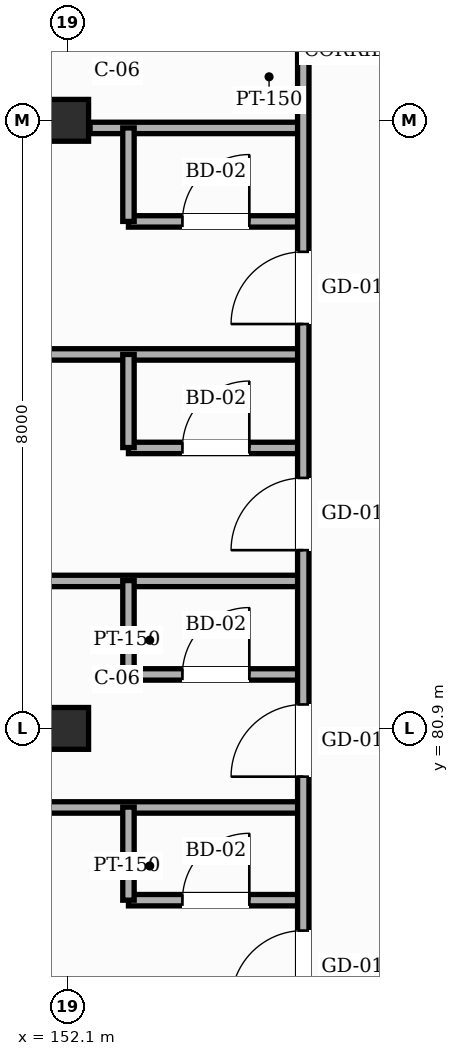
"""IFC4 building model, lengths in metres.
Left out: names, types, materials, properties, quantities, classifications, styles, units other than length and angle.
Written with IfcOpenShell. Run it as: python <this file> out.ifc"""

import sys

from ifc_helpers import new_model, si_unit, direction, frame, frame_2d, origin, origin_2d, place, context, subcontext, project, spatial, rectangle, hollow_rectangle, extrude, element, fill, save


model = new_model("IFC4")
c1 = context("Model", 3, precision=1e-05, world=origin(), true_north=direction((0.0, 1.0)))
c2 = subcontext(c1, "Body", "Model", "MODEL_VIEW")
j1 = project(units=[si_unit("LENGTHUNIT", "METRE"), si_unit("PLANEANGLEUNIT", "RADIAN")], contexts=[c1])
p1 = place(None, origin())
s1 = spatial("IfcSite", under=j1, at=p1, CompositionType="ELEMENT")
p2 = place(p1, origin())
s2 = spatial("IfcBuilding", under=s1, at=p2, CompositionType="ELEMENT")
p3 = place(p2, frame((0.0, 0.0, 31.8)))
s3 = spatial("IfcBuildingStorey", under=s2, at=p3, CompositionType="ELEMENT", Elevation=31.8)
for number, where, z_axis, x_axis in (
    (1, (152.1, 80.9, 0.0), (0.0, 0.0, 1.0), (1.0, 0.0, 0.0)),
    (2, (152.1, 88.9, 0.0), (0.0, 0.0, 1.0), (1.0, 0.0, 0.0)),
):
    element("IfcColumn", number, at=place(p3, frame(where, z_axis=z_axis, x_axis=x_axis)), inside=s3, PredefinedType="COLUMN", context=c2, shape_type="SweptSolid", body=[
        extrude(hollow_rectangle(XDim=0.55, YDim=0.55, WallThickness=0.022, InnerFilletRadius=0.022, OuterFilletRadius=0.044, at=origin_2d()), origin(), (0.0, 0.0, 1.0), 3.6),
    ])
p4 = place(p3, frame((152.9, 78.64, 0.0), z_axis=(0.0, 0.0, 1.0), x_axis=(1.0, 0.0, 0.0)))
e3 = element("IfcWall", 3, at=p4, inside=s3, PredefinedType="PARTITIONING", context=c2, shape_type="SweptSolid", body=[
    extrude(rectangle(XDim=2.3, YDim=0.15, at=frame_2d((1.15, 0.0))), origin(), (0.0, 0.0, 1.0), 3.365),
])
p5 = place(p4, frame((0.71, 0.0, 0.0)))
e4 = element("IfcOpeningElement", 4, at=p5, cuts=e3, PredefinedType="OPENING", context=c2, shape_type="SweptSolid", body=[
    extrude(rectangle(XDim=0.88, YDim=2.12, at=frame_2d((0.44, 1.06))), frame((0.0, 0.085, 0.0), z_axis=(0.0, -1.0, 0.0), x_axis=(1.0, 0.0, 0.0)), (0.0, 0.0, 1.0), 0.17),
])
p6 = place(p3, frame((144.2, 79.86, 0.0), z_axis=(0.0, 0.0, 1.0), x_axis=(1.0, 0.0, 0.0)))
e5 = element("IfcWall", 5, at=p6, inside=s3, PredefinedType="PARTITIONING", context=c2, shape_type="SweptSolid", body=[
    extrude(rectangle(XDim=11.0, YDim=0.15, at=frame_2d((5.5, 0.0))), origin(), (0.0, 0.0, 1.0), 3.365),
])
p7 = place(p3, frame((152.9, 81.61, 0.0), z_axis=(0.0, 0.0, 1.0), x_axis=(1.0, 0.0, 0.0)))
e6 = element("IfcWall", 6, at=p7, inside=s3, PredefinedType="PARTITIONING", context=c2, shape_type="SweptSolid", body=[
    extrude(rectangle(XDim=2.3, YDim=0.15, at=frame_2d((1.15, 0.0))), origin(), (0.0, 0.0, 1.0), 3.365),
])
p8 = place(p7, frame((0.71, 0.0, 0.0)))
e7 = element("IfcOpeningElement", 7, at=p8, cuts=e6, PredefinedType="OPENING", context=c2, shape_type="SweptSolid", body=[
    extrude(rectangle(XDim=0.88, YDim=2.12, at=frame_2d((0.44, 1.06))), frame((0.0, 0.085, 0.0), z_axis=(0.0, -1.0, 0.0), x_axis=(1.0, 0.0, 0.0)), (0.0, 0.0, 1.0), 0.17),
])
p9 = place(p3, frame((144.2, 82.84, 0.0), z_axis=(0.0, 0.0, 1.0), x_axis=(1.0, 0.0, 0.0)))
e8 = element("IfcWall", 8, at=p9, inside=s3, PredefinedType="PARTITIONING", context=c2, shape_type="SweptSolid", body=[
    extrude(rectangle(XDim=11.0, YDim=0.15, at=frame_2d((5.5, 0.0))), origin(), (0.0, 0.0, 1.0), 3.365),
])
p10 = place(p3, frame((152.9, 84.59, 0.0), z_axis=(0.0, 0.0, 1.0), x_axis=(1.0, 0.0, 0.0)))
e9 = element("IfcWall", 9, at=p10, inside=s3, PredefinedType="PARTITIONING", context=c2, shape_type="SweptSolid", body=[
    extrude(rectangle(XDim=2.3, YDim=0.15, at=frame_2d((1.15, 0.0))), origin(), (0.0, 0.0, 1.0), 3.005),
])
p11 = place(p10, frame((0.71, 0.0, 0.0)))
e10 = element("IfcOpeningElement", 10, at=p11, cuts=e9, PredefinedType="OPENING", context=c2, shape_type="SweptSolid", body=[
    extrude(rectangle(XDim=0.88, YDim=2.12, at=frame_2d((0.44, 1.06))), frame((0.0, 0.085, 0.0), z_axis=(0.0, -1.0, 0.0), x_axis=(1.0, 0.0, 0.0)), (0.0, 0.0, 1.0), 0.17),
])
p12 = place(p3, frame((144.2, 85.82, 0.0), z_axis=(0.0, 0.0, 1.0), x_axis=(1.0, 0.0, 0.0)))
e11 = element("IfcWall", 11, at=p12, inside=s3, PredefinedType="PARTITIONING", context=c2, shape_type="SweptSolid", body=[
    extrude(rectangle(XDim=11.0, YDim=0.15, at=frame_2d((5.5, 0.0))), origin(), (0.0, 0.0, 1.0), 3.365),
])
p13 = place(p3, frame((152.9, 87.57, 0.0), z_axis=(0.0, 0.0, 1.0), x_axis=(1.0, 0.0, 0.0)))
e12 = element("IfcWall", 12, at=p13, inside=s3, PredefinedType="PARTITIONING", context=c2, shape_type="SweptSolid", body=[
    extrude(rectangle(XDim=2.3, YDim=0.15, at=frame_2d((1.15, 0.0))), origin(), (0.0, 0.0, 1.0), 3.365),
])
p14 = place(p13, frame((0.71, 0.0, 0.0)))
e13 = element("IfcOpeningElement", 13, at=p14, cuts=e12, PredefinedType="OPENING", context=c2, shape_type="SweptSolid", body=[
    extrude(rectangle(XDim=0.88, YDim=2.12, at=frame_2d((0.44, 1.06))), frame((0.0, 0.085, 0.0), z_axis=(0.0, -1.0, 0.0), x_axis=(1.0, 0.0, 0.0)), (0.0, 0.0, 1.0), 0.17),
])
p15 = place(p3, frame((152.395, 88.8, 0.0), z_axis=(0.0, 0.0, 1.0), x_axis=(1.0, 0.0, 0.0)))
e14 = element("IfcWall", 14, at=p15, inside=s3, PredefinedType="PARTITIONING", context=c2, shape_type="SweptSolid", body=[
    extrude(rectangle(XDim=2.805, YDim=0.15, at=frame_2d((1.402, 0.0))), origin(), (0.0, 0.0, 1.0), 2.755),
])
p16 = place(p3, frame((152.9, 78.64, 0.0), z_axis=(0.0, 0.0, 1.0), x_axis=(0.0, 1.0, 0.0)))
e15 = element("IfcWall", 15, at=p16, inside=s3, PredefinedType="PARTITIONING", context=c2, shape_type="SweptSolid", body=[
    extrude(rectangle(XDim=1.225, YDim=0.15, at=frame_2d((0.613, 0.0))), origin(), (0.0, 0.0, 1.0), 3.365),
])
p17 = place(p3, frame((152.9, 81.615, 0.0), z_axis=(0.0, 0.0, 1.0), x_axis=(0.0, 1.0, 0.0)))
e16 = element("IfcWall", 16, at=p17, inside=s3, PredefinedType="PARTITIONING", context=c2, shape_type="SweptSolid", body=[
    extrude(rectangle(XDim=1.23, YDim=0.15, at=frame_2d((0.615, 0.0))), origin(), (0.0, 0.0, 1.0), 3.365),
])
p18 = place(p3, frame((152.9, 84.595, 0.0), z_axis=(0.0, 0.0, 1.0), x_axis=(0.0, 1.0, 0.0)))
e17 = element("IfcWall", 17, at=p18, inside=s3, PredefinedType="PARTITIONING", context=c2, shape_type="SweptSolid", body=[
    extrude(rectangle(XDim=1.225, YDim=0.15, at=frame_2d((0.613, 0.0))), origin(), (0.0, 0.0, 1.0), 3.365),
])
p19 = place(p3, frame((152.9, 87.57, 0.0), z_axis=(0.0, 0.0, 1.0), x_axis=(0.0, 1.0, 0.0)))
e18 = element("IfcWall", 18, at=p19, inside=s3, PredefinedType="PARTITIONING", context=c2, shape_type="SweptSolid", body=[
    extrude(rectangle(XDim=1.23, YDim=0.15, at=frame_2d((0.615, 0.0))), origin(), (0.0, 0.0, 1.0), 3.365),
])
p20 = place(p3, frame((155.2, 62.0, 0.0), z_axis=(0.0, 0.0, 1.0), x_axis=(0.0, 1.0, 0.0)))
e19 = element("IfcWall", 19, at=p20, inside=s3, PredefinedType="PARTITIONING", context=c2, shape_type="SweptSolid", body=[
    extrude(rectangle(XDim=34.4, YDim=0.15, at=frame_2d((17.2, 0.0))), origin(), (0.0, 0.0, 1.0), 3.365),
])
p21 = place(p20, frame((29.775, 0.0, 0.0)))
e20 = element("IfcOpeningElement", 20, at=p21, cuts=e19, PredefinedType="OPENING", context=c2, shape_type="SweptSolid", body=[
    extrude(rectangle(XDim=1.65, YDim=2.35, at=frame_2d((0.825, 1.175))), frame((0.0, 0.085, 0.0), z_axis=(0.0, -1.0, 0.0), x_axis=(1.0, 0.0, 0.0)), (0.0, 0.0, 1.0), 0.17),
])
p22 = place(p20, frame((0.4, 0.0, 0.0)))
e21 = element("IfcOpeningElement", 21, at=p22, cuts=e19, PredefinedType="OPENING", context=c2, shape_type="SweptSolid", body=[
    extrude(rectangle(XDim=0.95, YDim=2.15, at=frame_2d((0.475, 1.075))), frame((0.0, 0.085, 0.0), z_axis=(0.0, -1.0, 0.0), x_axis=(1.0, 0.0, 0.0)), (0.0, 0.0, 1.0), 0.17),
])
p23 = place(p20, frame((3.38, 0.0, 0.0)))
e22 = element("IfcOpeningElement", 22, at=p23, cuts=e19, PredefinedType="OPENING", context=c2, shape_type="SweptSolid", body=[
    extrude(rectangle(XDim=0.95, YDim=2.15, at=frame_2d((0.475, 1.075))), frame((0.0, 0.085, 0.0), z_axis=(0.0, -1.0, 0.0), x_axis=(1.0, 0.0, 0.0)), (0.0, 0.0, 1.0), 0.17),
])
p24 = place(p20, frame((6.355, 0.0, 0.0)))
e23 = element("IfcOpeningElement", 23, at=p24, cuts=e19, PredefinedType="OPENING", context=c2, shape_type="SweptSolid", body=[
    extrude(rectangle(XDim=0.95, YDim=2.15, at=frame_2d((0.475, 1.075))), frame((0.0, 0.085, 0.0), z_axis=(0.0, -1.0, 0.0), x_axis=(1.0, 0.0, 0.0)), (0.0, 0.0, 1.0), 0.17),
])
p25 = place(p20, frame((9.335, 0.0, 0.0)))
e24 = element("IfcOpeningElement", 24, at=p25, cuts=e19, PredefinedType="OPENING", context=c2, shape_type="SweptSolid", body=[
    extrude(rectangle(XDim=0.95, YDim=2.15, at=frame_2d((0.475, 1.075))), frame((0.0, 0.085, 0.0), z_axis=(0.0, -1.0, 0.0), x_axis=(1.0, 0.0, 0.0)), (0.0, 0.0, 1.0), 0.17),
])
p26 = place(p20, frame((12.31, 0.0, 0.0)))
e25 = element("IfcOpeningElement", 25, at=p26, cuts=e19, PredefinedType="OPENING", context=c2, shape_type="SweptSolid", body=[
    extrude(rectangle(XDim=0.95, YDim=2.15, at=frame_2d((0.475, 1.075))), frame((0.0, 0.085, 0.0), z_axis=(0.0, -1.0, 0.0), x_axis=(1.0, 0.0, 0.0)), (0.0, 0.0, 1.0), 0.17),
])
p27 = place(p20, frame((15.29, 0.0, 0.0)))
e26 = element("IfcOpeningElement", 26, at=p27, cuts=e19, PredefinedType="OPENING", context=c2, shape_type="SweptSolid", body=[
    extrude(rectangle(XDim=0.95, YDim=2.15, at=frame_2d((0.475, 1.075))), frame((0.0, 0.085, 0.0), z_axis=(0.0, -1.0, 0.0), x_axis=(1.0, 0.0, 0.0)), (0.0, 0.0, 1.0), 0.17),
])
p28 = place(p20, frame((18.265, 0.0, 0.0)))
e27 = element("IfcOpeningElement", 27, at=p28, cuts=e19, PredefinedType="OPENING", context=c2, shape_type="SweptSolid", body=[
    extrude(rectangle(XDim=0.95, YDim=2.15, at=frame_2d((0.475, 1.075))), frame((0.0, 0.085, 0.0), z_axis=(0.0, -1.0, 0.0), x_axis=(1.0, 0.0, 0.0)), (0.0, 0.0, 1.0), 0.17),
])
p29 = place(p20, frame((21.245, 0.0, 0.0)))
e28 = element("IfcOpeningElement", 28, at=p29, cuts=e19, PredefinedType="OPENING", context=c2, shape_type="SweptSolid", body=[
    extrude(rectangle(XDim=0.95, YDim=2.15, at=frame_2d((0.475, 1.075))), frame((0.0, 0.085, 0.0), z_axis=(0.0, -1.0, 0.0), x_axis=(1.0, 0.0, 0.0)), (0.0, 0.0, 1.0), 0.17),
])
p30 = place(p20, frame((24.22, 0.0, 0.0)))
e29 = element("IfcOpeningElement", 29, at=p30, cuts=e19, PredefinedType="OPENING", context=c2, shape_type="SweptSolid", body=[
    extrude(rectangle(XDim=0.95, YDim=2.15, at=frame_2d((0.475, 1.075))), frame((0.0, 0.085, 0.0), z_axis=(0.0, -1.0, 0.0), x_axis=(1.0, 0.0, 0.0)), (0.0, 0.0, 1.0), 0.17),
])
p31 = place(p27, origin())
e30 = element("IfcDoor", 30, at=p31, inside=s3, OperationType="SINGLE_SWING_LEFT", PredefinedType="DOOR", context=c2, shape_type="SweptSolid", body=[
    extrude(rectangle(XDim=0.95, YDim=2.15, at=frame_2d((0.475, 1.075))), frame((0.0, 0.025, 0.0), z_axis=(0.0, -1.0, 0.0), x_axis=(1.0, 0.0, 0.0)), (0.0, 0.0, 1.0), 0.05),
])
fill(e26, e30)
p32 = place(p5, origin())
e31 = element("IfcDoor", 31, at=p32, inside=s3, OperationType="SINGLE_SWING_RIGHT", PredefinedType="DOOR", context=c2, shape_type="SweptSolid", body=[
    extrude(rectangle(XDim=0.88, YDim=2.12, at=frame_2d((0.44, 1.06))), frame((0.0, 0.025, 0.0), z_axis=(0.0, -1.0, 0.0), x_axis=(1.0, 0.0, 0.0)), (0.0, 0.0, 1.0), 0.05),
])
fill(e4, e31)
p33 = place(p28, origin())
e32 = element("IfcDoor", 32, at=p33, inside=s3, OperationType="SINGLE_SWING_LEFT", PredefinedType="DOOR", context=c2, shape_type="SweptSolid", body=[
    extrude(rectangle(XDim=0.95, YDim=2.15, at=frame_2d((0.475, 1.075))), frame((0.0, 0.025, 0.0), z_axis=(0.0, -1.0, 0.0), x_axis=(1.0, 0.0, 0.0)), (0.0, 0.0, 1.0), 0.05),
])
fill(e27, e32)
p34 = place(p8, origin())
e33 = element("IfcDoor", 33, at=p34, inside=s3, OperationType="SINGLE_SWING_RIGHT", PredefinedType="DOOR", context=c2, shape_type="SweptSolid", body=[
    extrude(rectangle(XDim=0.88, YDim=2.12, at=frame_2d((0.44, 1.06))), frame((0.0, 0.025, 0.0), z_axis=(0.0, -1.0, 0.0), x_axis=(1.0, 0.0, 0.0)), (0.0, 0.0, 1.0), 0.05),
])
fill(e7, e33)
p35 = place(p29, origin())
e34 = element("IfcDoor", 34, at=p35, inside=s3, OperationType="SINGLE_SWING_LEFT", PredefinedType="DOOR", context=c2, shape_type="SweptSolid", body=[
    extrude(rectangle(XDim=0.95, YDim=2.15, at=frame_2d((0.475, 1.075))), frame((0.0, 0.025, 0.0), z_axis=(0.0, -1.0, 0.0), x_axis=(1.0, 0.0, 0.0)), (0.0, 0.0, 1.0), 0.05),
])
fill(e28, e34)
p36 = place(p11, origin())
e35 = element("IfcDoor", 35, at=p36, inside=s3, OperationType="SINGLE_SWING_RIGHT", PredefinedType="DOOR", context=c2, shape_type="SweptSolid", body=[
    extrude(rectangle(XDim=0.88, YDim=2.12, at=frame_2d((0.44, 1.06))), frame((0.0, 0.025, 0.0), z_axis=(0.0, -1.0, 0.0), x_axis=(1.0, 0.0, 0.0)), (0.0, 0.0, 1.0), 0.05),
])
fill(e10, e35)
p37 = place(p30, origin())
e36 = element("IfcDoor", 36, at=p37, inside=s3, OperationType="SINGLE_SWING_LEFT", PredefinedType="DOOR", context=c2, shape_type="SweptSolid", body=[
    extrude(rectangle(XDim=0.95, YDim=2.15, at=frame_2d((0.475, 1.075))), frame((0.0, 0.025, 0.0), z_axis=(0.0, -1.0, 0.0), x_axis=(1.0, 0.0, 0.0)), (0.0, 0.0, 1.0), 0.05),
])
fill(e29, e36)
p38 = place(p14, origin())
e37 = element("IfcDoor", 37, at=p38, inside=s3, OperationType="SINGLE_SWING_RIGHT", PredefinedType="DOOR", context=c2, shape_type="SweptSolid", body=[
    extrude(rectangle(XDim=0.88, YDim=2.12, at=frame_2d((0.44, 1.06))), frame((0.0, 0.025, 0.0), z_axis=(0.0, -1.0, 0.0), x_axis=(1.0, 0.0, 0.0)), (0.0, 0.0, 1.0), 0.05),
])
fill(e13, e37)
save(model, sys.argv[1])
